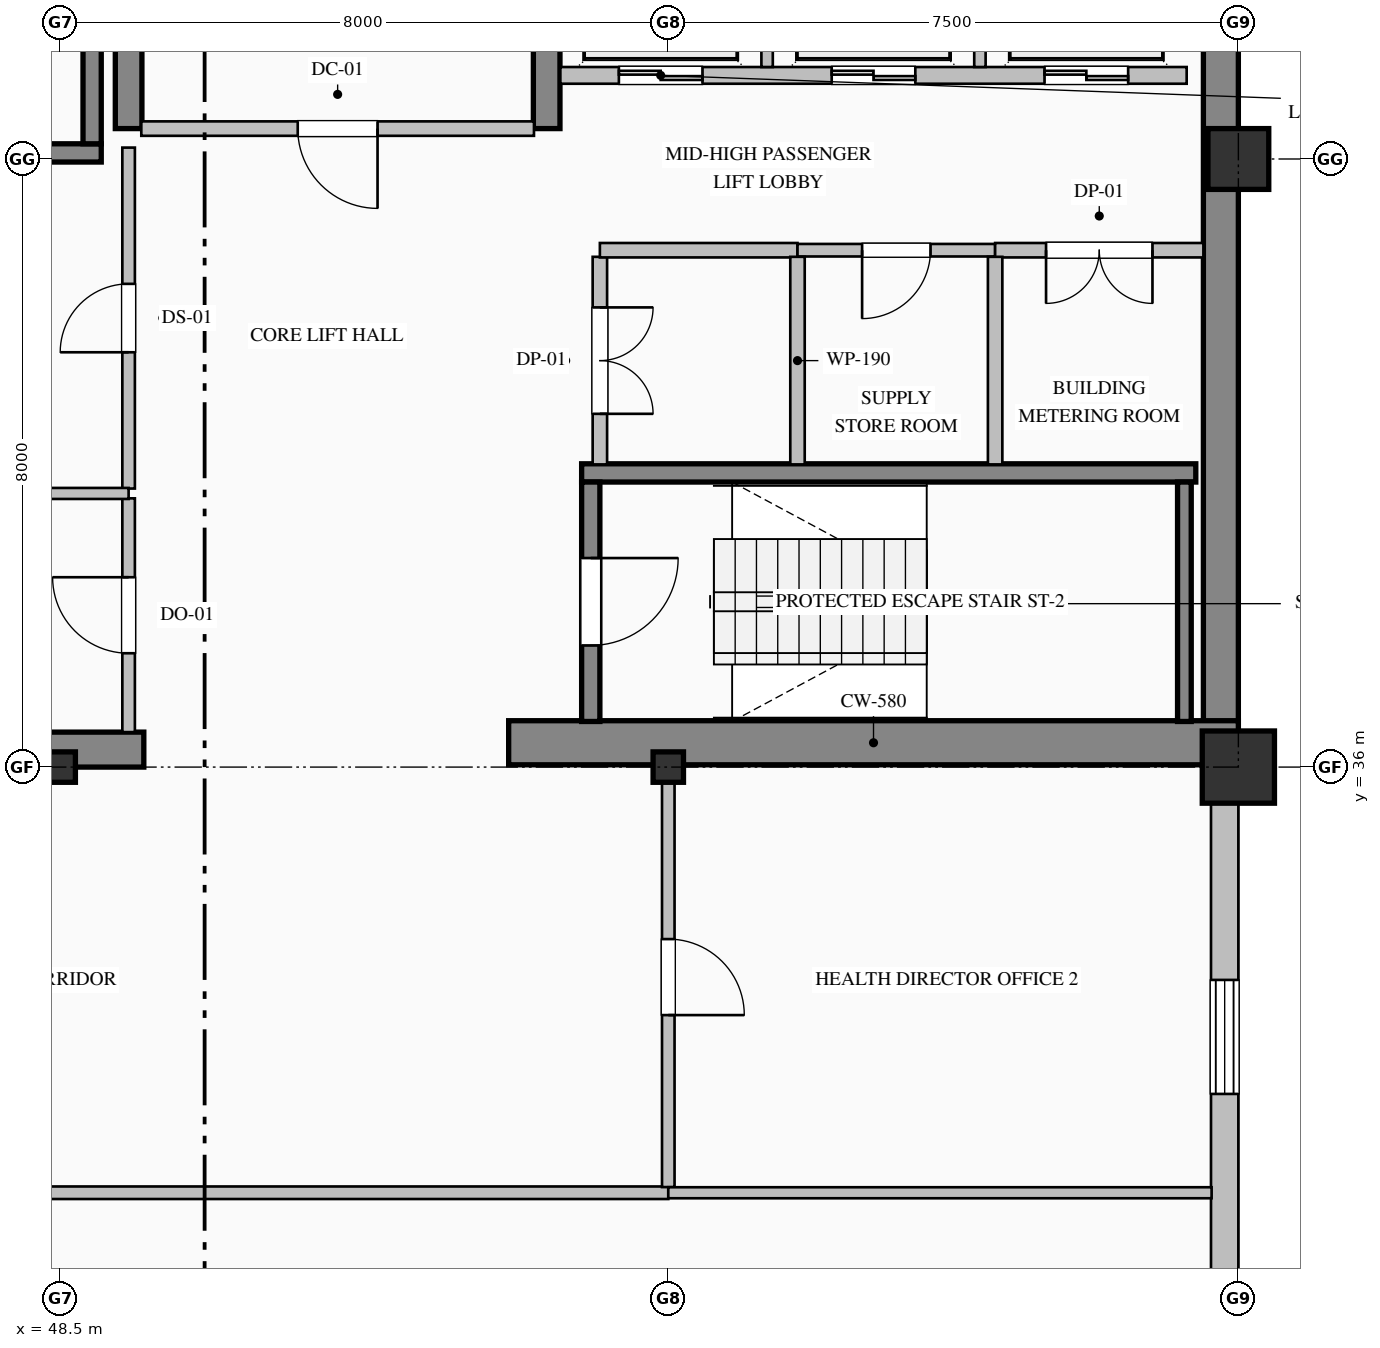
"""IFC4 building model, lengths in metres.
Left out: names, types, materials, properties, quantities, classifications, styles, units other than length and angle.
Written with IfcOpenShell. Run it as: python <this file> out.ifc"""

import sys

from ifc_helpers import new_model, si_unit, direction, frame, frame_2d, origin, origin_2d, place, context, subcontext, project, spatial, rectangle, hollow_rectangle, i_section, extrude, element, fill, save


model = new_model("IFC4")
c1 = context("Model", 3, precision=1e-05, world=origin(), true_north=direction((0.0, 1.0)))
c2 = subcontext(c1, "Body", "Model", "MODEL_VIEW")
j1 = project(units=[si_unit("LENGTHUNIT", "METRE"), si_unit("PLANEANGLEUNIT", "RADIAN")], contexts=[c1])
p1 = place(None, origin())
s1 = spatial("IfcSite", under=j1, at=p1, CompositionType="ELEMENT")
p2 = place(p1, origin())
s2 = spatial("IfcBuilding", under=s1, at=p2, CompositionType="ELEMENT")
p3 = place(p2, frame((0.0, 0.0, 257.8)))
s3 = spatial("IfcBuildingStorey", under=s2, at=p3, CompositionType="ELEMENT", Elevation=257.8)
p4 = place(p3, frame((63.77, 36.32, 0.0), z_axis=(0.0, 0.0, 1.0), x_axis=(0.0, 1.0, 0.0)))
e1 = element("IfcWall", 1, at=p4, inside=s3, PredefinedType="SHEAR", context=c2, shape_type="SweptSolid", body=[
    extrude(rectangle(XDim=15.22, YDim=0.46, at=frame_2d((7.61, 0.0))), origin(), (0.0, 0.0, 1.0), 3.775),
])
p5 = place(p3, frame((40.5, 36.23, 0.0), z_axis=(0.0, 0.0, 1.0), x_axis=(1.0, 0.0, 0.0)))
e2 = element("IfcWall", 2, at=p5, inside=s3, PredefinedType="SHEAR", context=c2, shape_type="SweptSolid", body=[
    extrude(rectangle(XDim=9.1, YDim=0.46, at=frame_2d((4.55, 0.0))), origin(), (0.0, 0.0, 1.0), 3.775),
])
p6 = place(p3, frame((54.4, 36.32, 0.0), z_axis=(0.0, 0.0, 1.0), x_axis=(1.0, 0.0, 0.0)))
e3 = element("IfcWall", 3, at=p6, inside=s3, PredefinedType="SHEAR", context=c2, shape_type="SweptSolid", body=[
    extrude(rectangle(XDim=9.6, YDim=0.58, at=frame_2d((4.8, 0.0))), origin(), (0.0, 0.0, 1.0), 4.0),
])
p7 = place(p3, frame((49.4, 44.4, 0.0), z_axis=(0.0, 0.0, 1.0), x_axis=(0.0, 1.0, 0.0)))
e4 = element("IfcWall", 4, at=p7, inside=s3, PredefinedType="SHEAR", context=c2, shape_type="SweptSolid", body=[
    extrude(rectangle(XDim=3.0, YDim=0.35, at=frame_2d((1.5, 0.0))), origin(), (0.0, 0.0, 1.0), 3.775),
])
p8 = place(p3, frame((54.9, 44.4, 0.0), z_axis=(0.0, 0.0, 1.0), x_axis=(0.0, 1.0, 0.0)))
e5 = element("IfcWall", 5, at=p8, inside=s3, PredefinedType="SHEAR", context=c2, shape_type="SweptSolid", body=[
    extrude(rectangle(XDim=7.14, YDim=0.35, at=frame_2d((3.57, 0.0))), origin(), (0.0, 0.0, 1.0), 3.775),
])
for number, where, z_axis, x_axis in (
    (6, (48.5, 36.0, 0.0), (0.0, 0.0, 1.0), (1.0, 0.0, 0.0)),
    (7, (56.5, 36.0, 0.0), (0.0, 0.0, 1.0), (1.0, 0.0, 0.0)),
):
    element("IfcColumn", number, at=place(p3, frame(where, z_axis=z_axis, x_axis=x_axis)), inside=s3, PredefinedType="COLUMN", context=c2, shape_type="SweptSolid", body=[
        extrude(i_section(OverallWidth=0.4, OverallDepth=0.4, WebThickness=0.013, FlangeThickness=0.021, FilletRadius=0.022, at=origin_2d()), origin(), (0.0, 0.0, 1.0), 4.0),
    ])
p9 = place(p3, frame((64.0, 36.0, 0.0), z_axis=(0.0, 0.0, 1.0), x_axis=(1.0, 0.0, 0.0)))
e8 = element("IfcColumn", 8, at=p9, inside=s3, PredefinedType="COLUMN", context=c2, shape_type="SweptSolid", body=[
    extrude(hollow_rectangle(XDim=0.95, YDim=0.95, WallThickness=0.036, at=origin_2d()), origin(), (0.0, 0.0, 1.0), 4.0),
])
p10 = place(p3, frame((64.0, 44.0, 0.0), z_axis=(0.0, 0.0, 1.0), x_axis=(1.0, 0.0, 0.0)))
e9 = element("IfcColumn", 9, at=p10, inside=s3, PredefinedType="COLUMN", context=c2, shape_type="SweptSolid", body=[
    extrude(hollow_rectangle(XDim=0.8, YDim=0.8, WallThickness=0.032, at=origin_2d()), origin(), (0.0, 0.0, 1.0), 4.0),
])
p11 = place(p3, frame((63.82, 36.05, 0.0), z_axis=(0.0, 0.0, 1.0), x_axis=(0.0, -1.0, 0.0)))
e10 = element("IfcWall", 10, at=p11, inside=s3, PredefinedType="SOLIDWALL", context=c2, shape_type="SweptSolid", body=[
    extrude(rectangle(XDim=19.55, YDim=0.36, at=frame_2d((9.775, 0.0))), origin(), (0.0, 0.0, 1.0), 3.325),
])
p12 = place(p11, frame((2.85, 0.0, 0.7)))
e11 = element("IfcOpeningElement", 11, at=p12, cuts=e10, PredefinedType="OPENING", context=c2, shape_type="SweptSolid", body=[
    extrude(rectangle(XDim=1.5, YDim=2.4, at=frame_2d((0.75, 1.2))), frame((0.0, 0.19, 0.0), z_axis=(0.0, -1.0, 0.0), x_axis=(1.0, 0.0, 0.0)), (0.0, 0.0, 1.0), 0.38),
])
p13 = place(p11, frame((10.125, 0.0, 0.9)))
e12 = element("IfcOpeningElement", 12, at=p13, cuts=e10, PredefinedType="OPENING", context=c2, shape_type="SweptSolid", body=[
    extrude(rectangle(XDim=1.35, YDim=1.85, at=frame_2d((0.675, 0.925))), frame((0.0, 0.19, 0.0), z_axis=(0.0, -1.0, 0.0), x_axis=(1.0, 0.0, 0.0)), (0.0, 0.0, 1.0), 0.38),
])
p14 = place(p11, frame((13.65, 0.0, 0.7)))
e13 = element("IfcOpeningElement", 13, at=p14, cuts=e10, PredefinedType="OPENING", context=c2, shape_type="SweptSolid", body=[
    extrude(rectangle(XDim=1.5, YDim=2.4, at=frame_2d((0.75, 1.2))), frame((0.0, 0.19, 0.0), z_axis=(0.0, -1.0, 0.0), x_axis=(1.0, 0.0, 0.0)), (0.0, 0.0, 1.0), 0.38),
])
p15 = place(p3, frame((49.04, 44.08, 0.0), z_axis=(0.0, 0.0, 1.0), x_axis=(-1.0, 0.0, 0.0)))
e14 = element("IfcWall", 14, at=p15, inside=s3, PredefinedType="SOLIDWALL", context=c2, shape_type="SweptSolid", body=[
    extrude(rectangle(XDim=8.08, YDim=0.24, at=frame_2d((4.04, 0.0))), origin(), (0.0, 0.0, 1.0), 4.0),
])
p16 = place(p3, frame((48.92, 44.2, 0.0), z_axis=(0.0, 0.0, 1.0), x_axis=(0.0, 1.0, 0.0)))
e15 = element("IfcWall", 15, at=p16, inside=s3, PredefinedType="SOLIDWALL", context=c2, shape_type="SweptSolid", body=[
    extrude(rectangle(XDim=3.15, YDim=0.24, at=frame_2d((1.575, 0.0))), origin(), (0.0, 0.0, 1.0), 4.0),
])
p17 = place(p3, frame((55.36, 39.87, 0.0), z_axis=(0.0, 0.0, 1.0), x_axis=(1.0, 0.0, 0.0)))
e16 = element("IfcWall", 16, at=p17, inside=s3, PredefinedType="SOLIDWALL", context=c2, shape_type="SweptSolid", body=[
    extrude(rectangle(XDim=8.08, YDim=0.24, at=frame_2d((4.04, 0.0))), origin(), (0.0, 0.0, 1.0), 4.0),
])
p18 = place(p3, frame((55.48, 39.75, 0.0), z_axis=(0.0, 0.0, 1.0), x_axis=(0.0, -1.0, 0.0)))
e17 = element("IfcWall", 17, at=p18, inside=s3, PredefinedType="SOLIDWALL", context=c2, shape_type="SweptSolid", body=[
    extrude(rectangle(XDim=3.15, YDim=0.24, at=frame_2d((1.575, 0.0))), origin(), (0.0, 0.0, 1.0), 4.0),
])
p19 = place(p18, frame((1.0, 0.0, 0.0)))
e18 = element("IfcOpeningElement", 18, at=p19, cuts=e17, PredefinedType="OPENING", context=c2, shape_type="SweptSolid", body=[
    extrude(rectangle(XDim=1.15, YDim=2.2, at=frame_2d((0.575, 1.1))), frame((0.0, 0.13, 0.0), z_axis=(0.0, -1.0, 0.0), x_axis=(1.0, 0.0, 0.0)), (0.0, 0.0, 1.0), 0.26),
])
p20 = place(p3, frame((63.29, 36.6, 0.0), z_axis=(0.0, 0.0, 1.0), x_axis=(0.0, 1.0, 0.0)))
e19 = element("IfcWall", 19, at=p20, inside=s3, PredefinedType="SOLIDWALL", context=c2, shape_type="SweptSolid", body=[
    extrude(rectangle(XDim=3.15, YDim=0.18, at=frame_2d((1.575, 0.0))), origin(), (0.0, 0.0, 1.0), 4.0),
])
p21 = place(p3, frame((63.32, 45.1, 0.0), z_axis=(0.0, 0.0, 1.0), x_axis=(-1.0, 0.0, 0.0)))
e20 = element("IfcWall", 20, at=p21, inside=s3, PredefinedType="PARTITIONING", context=c2, shape_type="SweptSolid", body=[
    extrude(rectangle(XDim=8.24, YDim=0.22, at=frame_2d((4.12, 0.0))), origin(), (0.0, 0.0, 1.0), 3.775),
])
p22 = place(p21, frame((6.37, 0.0, 0.0)))
e21 = element("IfcOpeningElement", 21, at=p22, cuts=e20, PredefinedType="OPENING", context=c2, shape_type="SweptSolid", body=[
    extrude(rectangle(XDim=1.1, YDim=2.2, at=frame_2d((0.55, 1.1))), frame((0.0, 0.12, 0.0), z_axis=(0.0, -1.0, 0.0), x_axis=(1.0, 0.0, 0.0)), (0.0, 0.0, 1.0), 0.24),
])
p23 = place(p21, frame((3.57, 0.0, 0.0)))
e22 = element("IfcOpeningElement", 22, at=p23, cuts=e20, PredefinedType="OPENING", context=c2, shape_type="SweptSolid", body=[
    extrude(rectangle(XDim=1.1, YDim=2.2, at=frame_2d((0.55, 1.1))), frame((0.0, 0.12, 0.0), z_axis=(0.0, -1.0, 0.0), x_axis=(1.0, 0.0, 0.0)), (0.0, 0.0, 1.0), 0.24),
])
p24 = place(p21, frame((0.77, 0.0, 0.0)))
e23 = element("IfcOpeningElement", 23, at=p24, cuts=e20, PredefinedType="OPENING", context=c2, shape_type="SweptSolid", body=[
    extrude(rectangle(XDim=1.1, YDim=2.2, at=frame_2d((0.55, 1.1))), frame((0.0, 0.12, 0.0), z_axis=(0.0, -1.0, 0.0), x_axis=(1.0, 0.0, 0.0)), (0.0, 0.0, 1.0), 0.24),
])
for number, where, z_axis, x_axis in (
    (24, (57.8, 45.21, 0.0), (0.0, 0.0, 1.0), (0.0, 1.0, 0.0)),
    (25, (60.6, 45.21, 0.0), (0.0, 0.0, 1.0), (0.0, 1.0, 0.0)),
):
    element("IfcWall", number, at=place(p3, frame(where, z_axis=z_axis, x_axis=x_axis)), inside=s3, PredefinedType="PARTITIONING", context=c2, shape_type="SweptSolid", body=[
        extrude(rectangle(XDim=2.03, YDim=0.15, at=frame_2d((1.015, 0.0))), origin(), (0.0, 0.0, 1.0), 3.775),
    ])
p25 = place(p3, frame((54.733, 44.4, 0.0), z_axis=(0.0, 0.0, 1.0), x_axis=(-1.0, 0.0, 0.0)))
e26 = element("IfcWall", 26, at=p25, inside=s3, PredefinedType="PARTITIONING", context=c2, shape_type="SweptSolid", body=[
    extrude(rectangle(XDim=5.166, YDim=0.19, at=frame_2d((2.583, 0.0))), origin(), (0.0, 0.0, 1.0), 3.775),
])
p26 = place(p25, frame((2.058, 0.0, 0.0)))
e27 = element("IfcOpeningElement", 27, at=p26, cuts=e26, PredefinedType="OPENING", context=c2, shape_type="SweptSolid", body=[
    extrude(rectangle(XDim=1.05, YDim=2.15, at=frame_2d((0.525, 1.075))), frame((0.0, 0.105, 0.0), z_axis=(0.0, -1.0, 0.0), x_axis=(1.0, 0.0, 0.0)), (0.0, 0.0, 1.0), 0.21),
])
p27 = place(p3, frame((49.4, 36.46, 0.0), z_axis=(0.0, 0.0, 1.0), x_axis=(0.0, 1.0, 0.0)))
e28 = element("IfcWall", 28, at=p27, inside=s3, PredefinedType="PARTITIONING", context=c2, shape_type="SweptSolid", body=[
    extrude(rectangle(XDim=3.075, YDim=0.165, at=frame_2d((1.538, 0.0))), origin(), (0.0, 0.0, 1.0), 3.017),
])
p28 = place(p27, frame((1.038, 0.0, 0.0)))
e29 = element("IfcOpeningElement", 29, at=p28, cuts=e28, PredefinedType="OPENING", context=c2, shape_type="SweptSolid", body=[
    extrude(rectangle(XDim=1.0, YDim=2.15, at=frame_2d((0.5, 1.075))), frame((0.0, 0.093, 0.0), z_axis=(0.0, -1.0, 0.0), x_axis=(1.0, 0.0, 0.0)), (0.0, 0.0, 1.0), 0.185),
])
p29 = place(p3, frame((49.4, 39.665, 0.0), z_axis=(0.0, 0.0, 1.0), x_axis=(0.0, 1.0, 0.0)))
e30 = element("IfcWall", 30, at=p29, inside=s3, PredefinedType="PARTITIONING", context=c2, shape_type="SweptSolid", body=[
    extrude(rectangle(XDim=4.485, YDim=0.165, at=frame_2d((2.243, 0.0))), origin(), (0.0, 0.0, 1.0), 3.017),
])
p30 = place(p29, frame((1.793, 0.0, 0.0)))
e31 = element("IfcOpeningElement", 31, at=p30, cuts=e30, PredefinedType="OPENING", context=c2, shape_type="SweptSolid", body=[
    extrude(rectangle(XDim=0.9, YDim=2.15, at=frame_2d((0.45, 1.075))), frame((0.0, 0.093, 0.0), z_axis=(0.0, -1.0, 0.0), x_axis=(1.0, 0.0, 0.0)), (0.0, 0.0, 1.0), 0.185),
])
p31 = place(p3, frame((55.6, 42.713, 0.0), z_axis=(0.0, 0.0, 1.0), x_axis=(0.0, -1.0, 0.0)))
e32 = element("IfcWall", 32, at=p31, inside=s3, PredefinedType="PARTITIONING", context=c2, shape_type="SweptSolid", body=[
    extrude(rectangle(XDim=2.731, YDim=0.19, at=frame_2d((1.365, 0.0))), origin(), (0.0, 0.0, 1.0), 3.775),
])
p32 = place(p31, frame((0.666, 0.0, 0.0)))
e33 = element("IfcOpeningElement", 33, at=p32, cuts=e32, PredefinedType="OPENING", context=c2, shape_type="SweptSolid", body=[
    extrude(rectangle(XDim=1.4, YDim=2.25, at=frame_2d((0.7, 1.125))), frame((0.0, 0.105, 0.0), z_axis=(0.0, -1.0, 0.0), x_axis=(1.0, 0.0, 0.0)), (0.0, 0.0, 1.0), 0.21),
])
p33 = place(p3, frame((40.96, 39.6, 0.0), z_axis=(0.0, 0.0, 1.0), x_axis=(1.0, 0.0, 0.0)))
e34 = element("IfcWall", 34, at=p33, inside=s3, PredefinedType="PARTITIONING", context=c2, shape_type="SweptSolid", body=[
    extrude(rectangle(XDim=8.44, YDim=0.145, at=frame_2d((4.22, 0.0))), origin(), (0.0, 0.0, 1.0), 3.775),
])
p34 = place(p3, frame((58.2, 42.8, 0.0), z_axis=(0.0, 0.0, 1.0), x_axis=(-1.0, 0.0, 0.0)))
e35 = element("IfcWall", 35, at=p34, inside=s3, PredefinedType="PARTITIONING", context=c2, shape_type="SweptSolid", body=[
    extrude(rectangle(XDim=2.6, YDim=0.19, at=frame_2d((1.3, 0.0))), origin(), (0.0, 0.0, 1.0), 3.775),
])
p35 = place(p3, frame((60.8, 42.8, 0.0), z_axis=(0.0, 0.0, 1.0), x_axis=(-1.0, 0.0, 0.0)))
e36 = element("IfcWall", 36, at=p35, inside=s3, PredefinedType="PARTITIONING", context=c2, shape_type="SweptSolid", body=[
    extrude(rectangle(XDim=2.6, YDim=0.165, at=frame_2d((1.3, 0.0))), origin(), (0.0, 0.0, 1.0), 3.775),
])
p36 = place(p35, frame((0.85, 0.0, 0.0)))
e37 = element("IfcOpeningElement", 37, at=p36, cuts=e36, PredefinedType="OPENING", context=c2, shape_type="SweptSolid", body=[
    extrude(rectangle(XDim=0.9, YDim=2.15, at=frame_2d((0.45, 1.075))), frame((0.0, 0.093, 0.0), z_axis=(0.0, -1.0, 0.0), x_axis=(1.0, 0.0, 0.0)), (0.0, 0.0, 1.0), 0.185),
])
p37 = place(p3, frame((63.54, 42.8, 0.0), z_axis=(0.0, 0.0, 1.0), x_axis=(-1.0, 0.0, 0.0)))
e38 = element("IfcWall", 38, at=p37, inside=s3, PredefinedType="PARTITIONING", context=c2, shape_type="SweptSolid", body=[
    extrude(rectangle(XDim=2.74, YDim=0.19, at=frame_2d((1.37, 0.0))), origin(), (0.0, 0.0, 1.0), 3.775),
])
p38 = place(p37, frame((0.67, 0.0, 0.0)))
e39 = element("IfcOpeningElement", 39, at=p38, cuts=e38, PredefinedType="OPENING", context=c2, shape_type="SweptSolid", body=[
    extrude(rectangle(XDim=1.4, YDim=2.25, at=frame_2d((0.7, 1.125))), frame((0.0, 0.105, 0.0), z_axis=(0.0, -1.0, 0.0), x_axis=(1.0, 0.0, 0.0)), (0.0, 0.0, 1.0), 0.21),
])
for number, where, z_axis, x_axis in (
    (40, (58.2, 42.713, 0.0), (0.0, 0.0, 1.0), (0.0, -1.0, 0.0)),
    (41, (60.8, 42.713, 0.0), (0.0, 0.0, 1.0), (0.0, -1.0, 0.0)),
):
    element("IfcWall", number, at=place(p3, frame(where, z_axis=z_axis, x_axis=x_axis)), inside=s3, PredefinedType="PARTITIONING", context=c2, shape_type="SweptSolid", body=[
        extrude(rectangle(XDim=2.731, YDim=0.19, at=frame_2d((1.365, 0.0))), origin(), (0.0, 0.0, 1.0), 3.775),
    ])
p39 = place(p3, frame((56.5, 30.4, 0.0), z_axis=(0.0, 0.0, 1.0), x_axis=(-1.0, 0.0, 0.0)))
e42 = element("IfcWall", 42, at=p39, inside=s3, PredefinedType="PARTITIONING", context=c2, shape_type="SweptSolid", body=[
    extrude(rectangle(XDim=11.3, YDim=0.165, at=frame_2d((5.65, 0.0))), origin(), (0.0, 0.0, 1.0), 3.775),
])
p40 = place(p3, frame((56.5, 36.0, 0.0), z_axis=(0.0, 0.0, 1.0), x_axis=(0.0, -1.0, 0.0)))
e43 = element("IfcWall", 43, at=p40, inside=s3, PredefinedType="PARTITIONING", context=c2, shape_type="SweptSolid", body=[
    extrude(rectangle(XDim=5.525, YDim=0.165, at=frame_2d((2.763, 0.0))), origin(), (0.0, 0.0, 1.0), 3.179),
])
p41 = place(p40, frame((2.263, 0.0, 0.0)))
e44 = element("IfcOpeningElement", 44, at=p41, cuts=e43, PredefinedType="OPENING", context=c2, shape_type="SweptSolid", body=[
    extrude(rectangle(XDim=1.0, YDim=2.15, at=frame_2d((0.5, 1.075))), frame((0.0, 0.093, 0.0), z_axis=(0.0, -1.0, 0.0), x_axis=(1.0, 0.0, 0.0)), (0.0, 0.0, 1.0), 0.185),
])
p42 = place(p3, frame((56.5, 30.4, 0.0), z_axis=(0.0, 0.0, 1.0), x_axis=(1.0, 0.0, 0.0)))
e45 = element("IfcWall", 45, at=p42, inside=s3, PredefinedType="PARTITIONING", context=c2, shape_type="SweptSolid", body=[
    extrude(rectangle(XDim=7.148, YDim=0.145, at=frame_2d((3.574, 0.0))), origin(), (0.0, 0.0, 1.0), 3.775),
])
p43 = place(p12, origin())
e46 = element("IfcWindow", 46, at=p43, inside=s3, PartitioningType="DOUBLE_PANEL_HORIZONTAL", PredefinedType="WINDOW", context=c2, shape_type="SweptSolid", body=[
    extrude(rectangle(XDim=1.5, YDim=2.4, at=frame_2d((0.75, 1.2))), frame((0.0, 0.15, 0.0), z_axis=(0.0, -1.0, 0.0), x_axis=(1.0, 0.0, 0.0)), (0.0, 0.0, 1.0), 0.06),
])
fill(e11, e46)
p44 = place(p19, origin())
e47 = element("IfcDoor", 47, at=p44, inside=s3, OperationType="SINGLE_SWING_LEFT", PredefinedType="DOOR", context=c2, shape_type="SweptSolid", body=[
    extrude(rectangle(XDim=1.15, YDim=2.2, at=frame_2d((0.575, 1.1))), frame((0.0, 0.025, 0.0), z_axis=(0.0, -1.0, 0.0), x_axis=(1.0, 0.0, 0.0)), (0.0, 0.0, 1.0), 0.05),
])
fill(e18, e47)
p45 = place(p22, origin())
e48 = element("IfcDoor", 48, at=p45, inside=s3, OperationType="DOUBLE_DOOR_SLIDING", PredefinedType="DOOR", context=c2, shape_type="SweptSolid", body=[
    extrude(rectangle(XDim=1.1, YDim=2.2, at=frame_2d((0.55, 1.1))), frame((0.0, 0.025, 0.0), z_axis=(0.0, -1.0, 0.0), x_axis=(1.0, 0.0, 0.0)), (0.0, 0.0, 1.0), 0.05),
])
fill(e21, e48)
p46 = place(p23, origin())
e49 = element("IfcDoor", 49, at=p46, inside=s3, OperationType="DOUBLE_DOOR_SLIDING", PredefinedType="DOOR", context=c2, shape_type="SweptSolid", body=[
    extrude(rectangle(XDim=1.1, YDim=2.2, at=frame_2d((0.55, 1.1))), frame((0.0, 0.025, 0.0), z_axis=(0.0, -1.0, 0.0), x_axis=(1.0, 0.0, 0.0)), (0.0, 0.0, 1.0), 0.05),
])
fill(e22, e49)
p47 = place(p24, origin())
e50 = element("IfcDoor", 50, at=p47, inside=s3, OperationType="DOUBLE_DOOR_SLIDING", PredefinedType="DOOR", context=c2, shape_type="SweptSolid", body=[
    extrude(rectangle(XDim=1.1, YDim=2.2, at=frame_2d((0.55, 1.1))), frame((0.0, 0.025, 0.0), z_axis=(0.0, -1.0, 0.0), x_axis=(1.0, 0.0, 0.0)), (0.0, 0.0, 1.0), 0.05),
])
fill(e23, e50)
p48 = place(p26, origin())
e51 = element("IfcDoor", 51, at=p48, inside=s3, OperationType="SINGLE_SWING_LEFT", PredefinedType="DOOR", context=c2, shape_type="SweptSolid", body=[
    extrude(rectangle(XDim=1.05, YDim=2.15, at=frame_2d((0.525, 1.075))), frame((0.0, 0.025, 0.0), z_axis=(0.0, -1.0, 0.0), x_axis=(1.0, 0.0, 0.0)), (0.0, 0.0, 1.0), 0.05),
])
fill(e27, e51)
p49 = place(p28, origin())
e52 = element("IfcDoor", 52, at=p49, inside=s3, OperationType="SINGLE_SWING_RIGHT", PredefinedType="DOOR", context=c2, shape_type="SweptSolid", body=[
    extrude(rectangle(XDim=1.0, YDim=2.15, at=frame_2d((0.5, 1.075))), frame((0.0, 0.025, 0.0), z_axis=(0.0, -1.0, 0.0), x_axis=(1.0, 0.0, 0.0)), (0.0, 0.0, 1.0), 0.05),
])
fill(e29, e52)
p50 = place(p30, origin())
e53 = element("IfcDoor", 53, at=p50, inside=s3, OperationType="SINGLE_SWING_LEFT", PredefinedType="DOOR", context=c2, shape_type="SweptSolid", body=[
    extrude(rectangle(XDim=0.9, YDim=2.15, at=frame_2d((0.45, 1.075))), frame((0.0, 0.025, 0.0), z_axis=(0.0, -1.0, 0.0), x_axis=(1.0, 0.0, 0.0)), (0.0, 0.0, 1.0), 0.05),
])
fill(e31, e53)
p51 = place(p32, origin())
e54 = element("IfcDoor", 54, at=p51, inside=s3, OperationType="DOUBLE_DOOR_SINGLE_SWING", PredefinedType="DOOR", context=c2, shape_type="SweptSolid", body=[
    extrude(rectangle(XDim=1.4, YDim=2.25, at=frame_2d((0.7, 1.125))), frame((0.0, 0.025, 0.0), z_axis=(0.0, -1.0, 0.0), x_axis=(1.0, 0.0, 0.0)), (0.0, 0.0, 1.0), 0.05),
])
fill(e33, e54)
p52 = place(p36, origin())
e55 = element("IfcDoor", 55, at=p52, inside=s3, OperationType="SINGLE_SWING_RIGHT", PredefinedType="DOOR", context=c2, shape_type="SweptSolid", body=[
    extrude(rectangle(XDim=0.9, YDim=2.15, at=frame_2d((0.45, 1.075))), frame((0.0, 0.025, 0.0), z_axis=(0.0, -1.0, 0.0), x_axis=(1.0, 0.0, 0.0)), (0.0, 0.0, 1.0), 0.05),
])
fill(e37, e55)
p53 = place(p38, origin())
e56 = element("IfcDoor", 56, at=p53, inside=s3, OperationType="DOUBLE_DOOR_SINGLE_SWING", PredefinedType="DOOR", context=c2, shape_type="SweptSolid", body=[
    extrude(rectangle(XDim=1.4, YDim=2.25, at=frame_2d((0.7, 1.125))), frame((0.0, 0.025, 0.0), z_axis=(0.0, -1.0, 0.0), x_axis=(1.0, 0.0, 0.0)), (0.0, 0.0, 1.0), 0.05),
])
fill(e39, e56)
p54 = place(p41, origin())
e57 = element("IfcDoor", 57, at=p54, inside=s3, OperationType="SINGLE_SWING_RIGHT", PredefinedType="DOOR", context=c2, shape_type="SweptSolid", body=[
    extrude(rectangle(XDim=1.0, YDim=2.15, at=frame_2d((0.5, 1.075))), frame((0.0, 0.025, 0.0), z_axis=(0.0, -1.0, 0.0), x_axis=(1.0, 0.0, 0.0)), (0.0, 0.0, 1.0), 0.05),
])
fill(e44, e57)
save(model, sys.argv[1])
